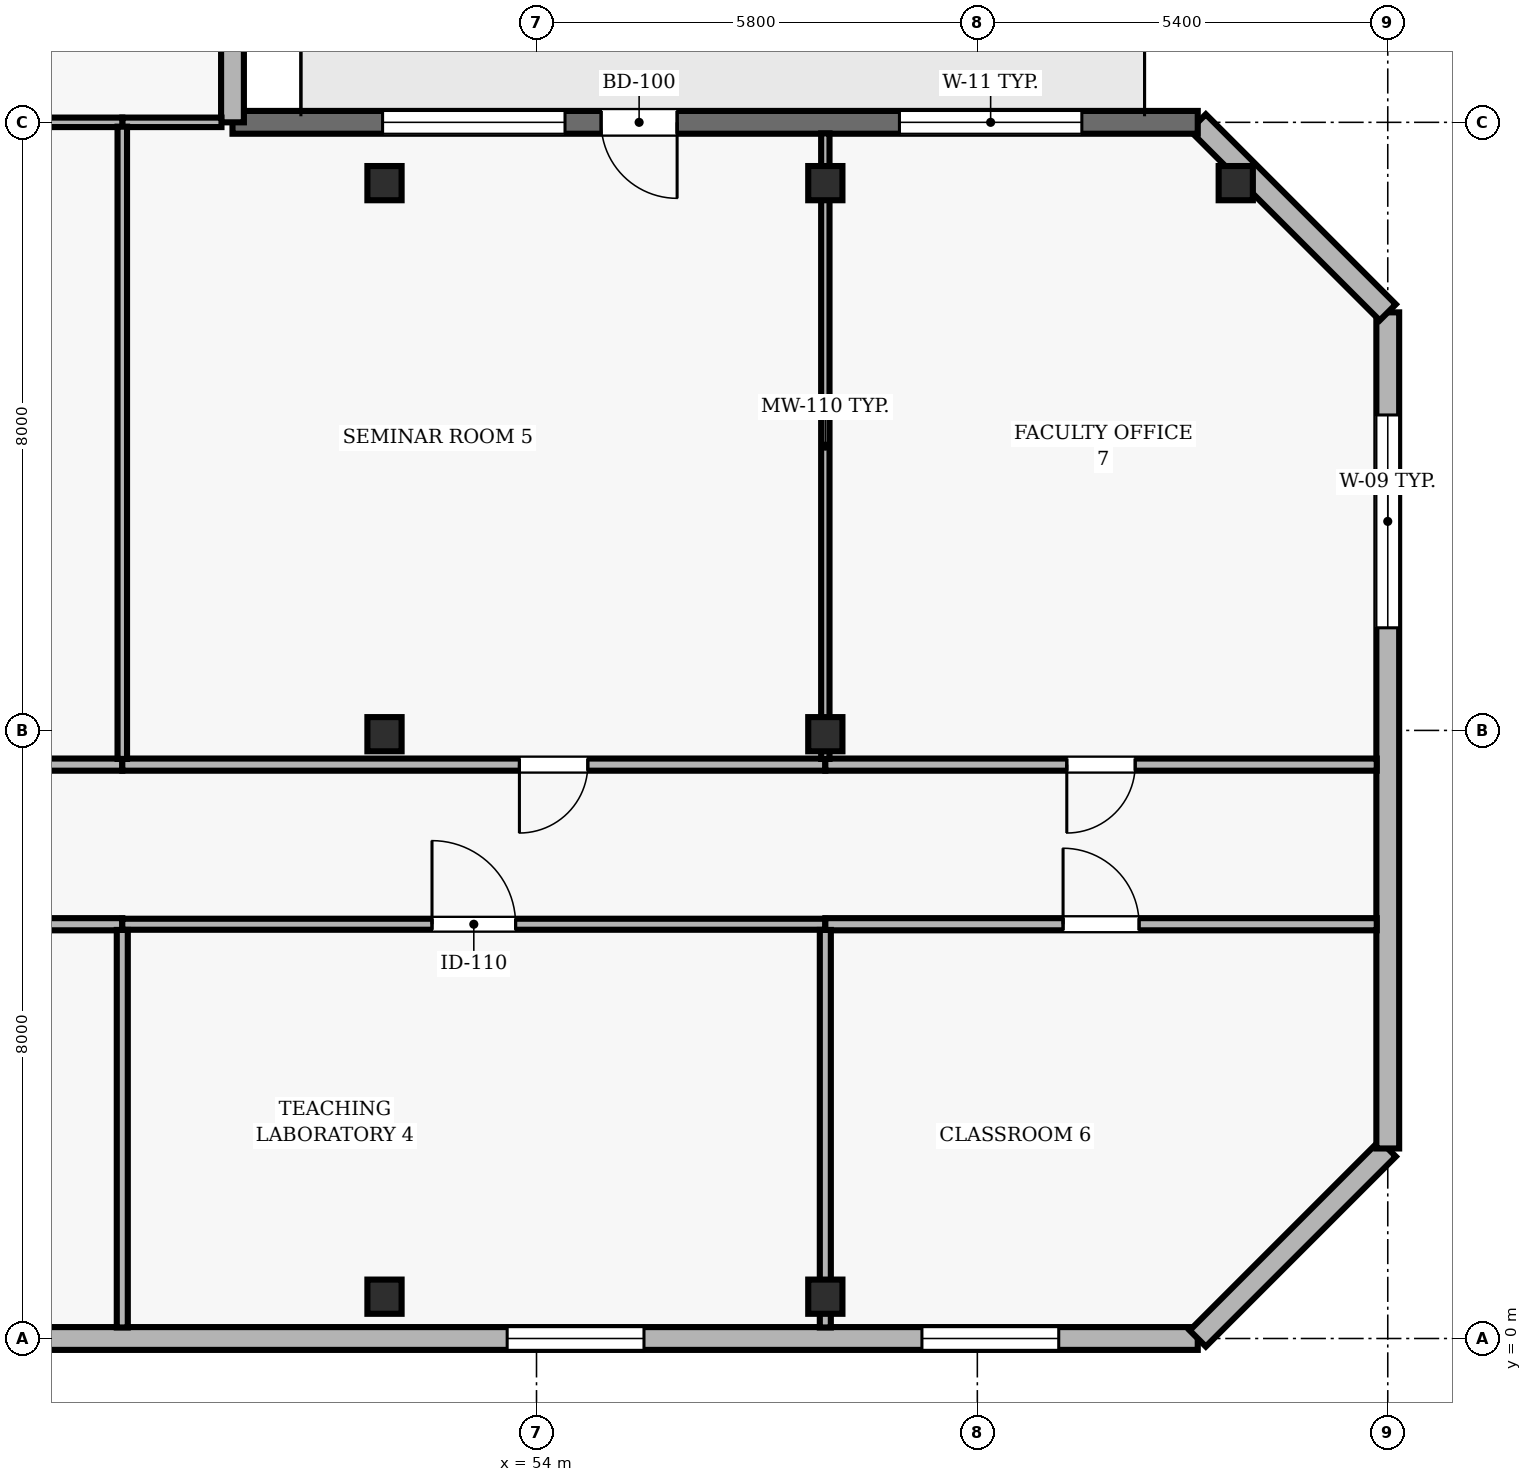
"""IFC4 building model, lengths in metres.
Left out: names, types, materials, properties, quantities, classifications, styles, units other than length and angle.
Written with IfcOpenShell. Run it as: python <this file> out.ifc"""

import sys

from ifc_helpers import new_model, si_unit, direction, frame, frame_2d, origin, origin_2d, place, context, subcontext, project, spatial, rectangle, hollow_rectangle, extrude, element, fill, save


model = new_model("IFC4")
c1 = context("Model", 3, precision=1e-05, world=origin(), true_north=direction((0.0, 1.0)))
c2 = subcontext(c1, "Body", "Model", "MODEL_VIEW")
j1 = project(units=[si_unit("LENGTHUNIT", "METRE"), si_unit("PLANEANGLEUNIT", "RADIAN")], contexts=[c1])
p1 = place(None, origin())
s1 = spatial("IfcSite", under=j1, at=p1, CompositionType="ELEMENT")
p2 = place(p1, origin())
s2 = spatial("IfcBuilding", under=s1, at=p2, CompositionType="ELEMENT")
p3 = place(p2, frame((0.0, 0.0, 175.8)))
s3 = spatial("IfcBuildingStorey", under=s2, at=p3, CompositionType="ELEMENT", Elevation=175.8)
for number, where, z_axis, x_axis in (
    (1, (52.0, 0.55, 0.0), (0.0, 0.0, 1.0), (1.0, 0.0, 0.0)),
    (2, (52.0, 7.95, 0.0), (0.0, 0.0, 1.0), (1.0, 0.0, 0.0)),
    (3, (52.0, 15.2, 0.0), (0.0, 0.0, 1.0), (1.0, 0.0, 0.0)),
    (4, (57.8, 0.55, 0.0), (0.0, 0.0, 1.0), (1.0, 0.0, 0.0)),
    (5, (57.8, 7.95, 0.0), (0.0, 0.0, 1.0), (1.0, 0.0, 0.0)),
    (6, (57.8, 15.2, 0.0), (0.0, 0.0, 1.0), (1.0, 0.0, 0.0)),
    (7, (63.2, 15.2, 0.0), (0.0, 0.0, 1.0), (1.0, 0.0, 0.0)),
):
    element("IfcColumn", number, at=place(p3, frame(where, z_axis=z_axis, x_axis=x_axis)), inside=s3, PredefinedType="COLUMN", context=c2, shape_type="SweptSolid", body=[
        extrude(hollow_rectangle(XDim=0.45, YDim=0.45, WallThickness=0.02, at=origin_2d()), origin(), (0.0, 0.0, 1.0), 3.9),
    ])
p4 = place(p3, frame((24.5, 0.0, 0.0), z_axis=(0.0, 0.0, 1.0), x_axis=(1.0, 0.0, 0.0)))
e8 = element("IfcWall", 8, at=p4, inside=s3, PredefinedType="SOLIDWALL", context=c2, shape_type="SweptSolid", body=[
    extrude(rectangle(XDim=38.2, YDim=0.3, at=frame_2d((19.1, 0.0))), origin(), (0.0, 0.0, 1.0), 3.69),
])
p5 = place(p4, frame((1.829, 0.0, 0.9)))
e9 = element("IfcOpeningElement", 9, at=p5, cuts=e8, PredefinedType="OPENING", context=c2, shape_type="SweptSolid", body=[
    extrude(rectangle(XDim=1.8, YDim=1.8, at=frame_2d((0.9, 0.9))), frame((0.0, 0.16, 0.0), z_axis=(0.0, -1.0, 0.0), x_axis=(1.0, 0.0, 0.0)), (0.0, 0.0, 1.0), 0.32),
])
p6 = place(p4, frame((8.186, 0.0, 0.9)))
e10 = element("IfcOpeningElement", 10, at=p6, cuts=e8, PredefinedType="OPENING", context=c2, shape_type="SweptSolid", body=[
    extrude(rectangle(XDim=1.8, YDim=1.8, at=frame_2d((0.9, 0.9))), frame((0.0, 0.16, 0.0), z_axis=(0.0, -1.0, 0.0), x_axis=(1.0, 0.0, 0.0)), (0.0, 0.0, 1.0), 0.32),
])
p7 = place(p4, frame((18.2, 0.0, 0.9)))
e11 = element("IfcOpeningElement", 11, at=p7, cuts=e8, PredefinedType="OPENING", context=c2, shape_type="SweptSolid", body=[
    extrude(rectangle(XDim=1.8, YDim=1.8, at=frame_2d((0.9, 0.9))), frame((0.0, 0.16, 0.0), z_axis=(0.0, -1.0, 0.0), x_axis=(1.0, 0.0, 0.0)), (0.0, 0.0, 1.0), 0.32),
])
p8 = place(p4, frame((29.114, 0.0, 0.9)))
e12 = element("IfcOpeningElement", 12, at=p8, cuts=e8, PredefinedType="OPENING", context=c2, shape_type="SweptSolid", body=[
    extrude(rectangle(XDim=1.8, YDim=1.8, at=frame_2d((0.9, 0.9))), frame((0.0, 0.16, 0.0), z_axis=(0.0, -1.0, 0.0), x_axis=(1.0, 0.0, 0.0)), (0.0, 0.0, 1.0), 0.32),
])
p9 = place(p4, frame((34.571, 0.0, 0.9)))
e13 = element("IfcOpeningElement", 13, at=p9, cuts=e8, PredefinedType="OPENING", context=c2, shape_type="SweptSolid", body=[
    extrude(rectangle(XDim=1.8, YDim=1.8, at=frame_2d((0.9, 0.9))), frame((0.0, 0.16, 0.0), z_axis=(0.0, -1.0, 0.0), x_axis=(1.0, 0.0, 0.0)), (0.0, 0.0, 1.0), 0.32),
])
p10 = place(p3, frame((62.7, 0.0, 0.0), z_axis=(0.0, 0.0, 1.0), x_axis=(0.707106781187, 0.707106781187, 0.0)))
e14 = element("IfcWall", 14, at=p10, inside=s3, PredefinedType="SOLIDWALL", context=c2, shape_type="SweptSolid", body=[
    extrude(rectangle(XDim=3.536, YDim=0.3, at=frame_2d((1.768, 0.0))), origin(), (0.0, 0.0, 1.0), 3.69),
])
p11 = place(p3, frame((65.2, 2.5, 0.0), z_axis=(0.0, 0.0, 1.0), x_axis=(0.0, 1.0, 0.0)))
e15 = element("IfcWall", 15, at=p11, inside=s3, PredefinedType="SOLIDWALL", context=c2, shape_type="SweptSolid", body=[
    extrude(rectangle(XDim=11.0, YDim=0.3, at=frame_2d((5.5, 0.0))), origin(), (0.0, 0.0, 1.0), 3.69),
])
p12 = place(p11, frame((6.85, 0.0, 0.9)))
e16 = element("IfcOpeningElement", 16, at=p12, cuts=e15, PredefinedType="OPENING", context=c2, shape_type="SweptSolid", body=[
    extrude(rectangle(XDim=2.8, YDim=1.8, at=frame_2d((1.4, 0.9))), frame((0.0, 0.16, 0.0), z_axis=(0.0, -1.0, 0.0), x_axis=(1.0, 0.0, 0.0)), (0.0, 0.0, 1.0), 0.32),
])
p13 = place(p3, frame((65.2, 13.5, 0.0), z_axis=(0.0, 0.0, 1.0), x_axis=(-0.707106781187, 0.707106781187, 0.0)))
e17 = element("IfcWall", 17, at=p13, inside=s3, PredefinedType="SOLIDWALL", context=c2, shape_type="SweptSolid", body=[
    extrude(rectangle(XDim=3.536, YDim=0.3, at=frame_2d((1.768, 0.0))), origin(), (0.0, 0.0, 1.0), 3.69),
])
p14 = place(p3, frame((62.7, 16.0, 0.0), z_axis=(0.0, 0.0, 1.0), x_axis=(-1.0, 0.0, 0.0)))
e18 = element("IfcWall", 18, at=p14, inside=s3, PredefinedType="SOLIDWALL", context=c2, shape_type="SweptSolid", body=[
    extrude(rectangle(XDim=12.7, YDim=0.3, at=frame_2d((6.35, 0.0))), origin(), (0.0, 0.0, 1.0), 3.69),
])
p15 = place(p14, frame((6.85, 0.0, 0.0)))
e19 = element("IfcOpeningElement", 19, at=p15, cuts=e18, PredefinedType="OPENING", context=c2, shape_type="SweptSolid", body=[
    extrude(rectangle(XDim=1.0, YDim=2.2, at=frame_2d((0.5, 1.1))), frame((0.0, 0.16, 0.0), z_axis=(0.0, -1.0, 0.0), x_axis=(1.0, 0.0, 0.0)), (0.0, 0.0, 1.0), 0.32),
])
p16 = place(p14, frame((1.525, 0.0, 0.9)))
e20 = element("IfcOpeningElement", 20, at=p16, cuts=e18, PredefinedType="OPENING", context=c2, shape_type="SweptSolid", body=[
    extrude(rectangle(XDim=2.4, YDim=2.2, at=frame_2d((1.2, 1.1))), frame((0.0, 0.16, 0.0), z_axis=(0.0, -1.0, 0.0), x_axis=(1.0, 0.0, 0.0)), (0.0, 0.0, 1.0), 0.32),
])
p17 = place(p14, frame((8.325, 0.0, 0.9)))
e21 = element("IfcOpeningElement", 21, at=p17, cuts=e18, PredefinedType="OPENING", context=c2, shape_type="SweptSolid", body=[
    extrude(rectangle(XDim=2.4, YDim=2.2, at=frame_2d((1.2, 1.1))), frame((0.0, 0.16, 0.0), z_axis=(0.0, -1.0, 0.0), x_axis=(1.0, 0.0, 0.0)), (0.0, 0.0, 1.0), 0.32),
])
p18 = place(p3, frame((50.0, 16.0, 0.0), z_axis=(0.0, 0.0, 1.0), x_axis=(0.0, 1.0, 0.0)))
e22 = element("IfcWall", 22, at=p18, inside=s3, PredefinedType="SOLIDWALL", context=c2, shape_type="SweptSolid", body=[
    extrude(rectangle(XDim=7.44, YDim=0.3, at=frame_2d((3.72, 0.0))), origin(), (0.0, 0.0, 1.0), 3.69),
])
p19 = place(p18, frame((2.22, 0.0, 0.9)))
e23 = element("IfcOpeningElement", 23, at=p19, cuts=e22, PredefinedType="OPENING", context=c2, shape_type="SweptSolid", body=[
    extrude(rectangle(XDim=3.0, YDim=2.2, at=frame_2d((1.5, 1.1))), frame((0.0, 0.16, 0.0), z_axis=(0.0, -1.0, 0.0), x_axis=(1.0, 0.0, 0.0)), (0.0, 0.0, 1.0), 0.32),
])
p20 = place(p3, frame((40.35, 5.45, 0.0), z_axis=(0.0, 0.0, 1.0), x_axis=(1.0, 0.0, 0.0)))
e24 = element("IfcWall", 24, at=p20, inside=s3, PredefinedType="PARTITIONING", context=c2, shape_type="SweptSolid", body=[
    extrude(rectangle(XDim=8.2, YDim=0.16, at=frame_2d((4.1, 0.0))), origin(), (0.0, 0.0, 1.0), 3.343),
])
p21 = place(p20, frame((3.65, 0.0, 0.0)))
e25 = element("IfcOpeningElement", 25, at=p21, cuts=e24, PredefinedType="OPENING", context=c2, shape_type="SweptSolid", body=[
    extrude(rectangle(XDim=0.9, YDim=2.1, at=frame_2d((0.45, 1.05))), frame((0.0, 0.09, 0.0), z_axis=(0.0, -1.0, 0.0), x_axis=(1.0, 0.0, 0.0)), (0.0, 0.0, 1.0), 0.18),
])
p22 = place(p3, frame((48.55, 5.45, 0.0), z_axis=(0.0, 0.0, 1.0), x_axis=(1.0, 0.0, 0.0)))
e26 = element("IfcWall", 26, at=p22, inside=s3, PredefinedType="PARTITIONING", context=c2, shape_type="SweptSolid", body=[
    extrude(rectangle(XDim=9.25, YDim=0.145, at=frame_2d((4.625, 0.0))), origin(), (0.0, 0.0, 1.0), 3.343),
])
p23 = place(p22, frame((4.075, 0.0, 0.0)))
e27 = element("IfcOpeningElement", 27, at=p23, cuts=e26, PredefinedType="OPENING", context=c2, shape_type="SweptSolid", body=[
    extrude(rectangle(XDim=1.1, YDim=2.15, at=frame_2d((0.55, 1.075))), frame((0.0, 0.083, 0.0), z_axis=(0.0, -1.0, 0.0), x_axis=(1.0, 0.0, 0.0)), (0.0, 0.0, 1.0), 0.165),
])
p24 = place(p3, frame((48.55, 7.55, 0.0), z_axis=(0.0, 0.0, 1.0), x_axis=(-1.0, 0.0, 0.0)))
e28 = element("IfcWall", 28, at=p24, inside=s3, PredefinedType="PARTITIONING", context=c2, shape_type="SweptSolid", body=[
    extrude(rectangle(XDim=8.2, YDim=0.16, at=frame_2d((4.1, 0.0))), origin(), (0.0, 0.0, 1.0), 3.139),
])
p25 = place(p3, frame((48.55, 16.0, 0.0), z_axis=(0.0, 0.0, 1.0), x_axis=(1.0, 0.0, 0.0)))
e29 = element("IfcWall", 29, at=p25, inside=s3, PredefinedType="PARTITIONING", context=c2, shape_type="SweptSolid", body=[
    extrude(rectangle(XDim=1.305, YDim=0.125, at=frame_2d((0.652, 0.0))), origin(), (0.0, 0.0, 1.0), 3.69),
])
p26 = place(p3, frame((48.55, 16.0, 0.0), z_axis=(0.0, 0.0, 1.0), x_axis=(-1.0, 0.0, 0.0)))
e30 = element("IfcWall", 30, at=p26, inside=s3, PredefinedType="PARTITIONING", context=c2, shape_type="SweptSolid", body=[
    extrude(rectangle(XDim=8.2, YDim=0.125, at=frame_2d((4.1, 0.0))), origin(), (0.0, 0.0, 1.0), 3.69),
])
p27 = place(p3, frame((57.8, 5.45, 0.0), z_axis=(0.0, 0.0, 1.0), x_axis=(1.0, 0.0, 0.0)))
e31 = element("IfcWall", 31, at=p27, inside=s3, PredefinedType="PARTITIONING", context=c2, shape_type="SweptSolid", body=[
    extrude(rectangle(XDim=7.255, YDim=0.16, at=frame_2d((3.627, 0.0))), origin(), (0.0, 0.0, 1.0), 3.69),
])
p28 = place(p27, frame((3.128, 0.0, 0.0)))
e32 = element("IfcOpeningElement", 32, at=p28, cuts=e31, PredefinedType="OPENING", context=c2, shape_type="SweptSolid", body=[
    extrude(rectangle(XDim=1.0, YDim=2.1, at=frame_2d((0.5, 1.05))), frame((0.0, 0.09, 0.0), z_axis=(0.0, -1.0, 0.0), x_axis=(1.0, 0.0, 0.0)), (0.0, 0.0, 1.0), 0.18),
])
p29 = place(p3, frame((57.8, 7.55, 0.0), z_axis=(0.0, 0.0, 1.0), x_axis=(-1.0, 0.0, 0.0)))
e33 = element("IfcWall", 33, at=p29, inside=s3, PredefinedType="PARTITIONING", context=c2, shape_type="SweptSolid", body=[
    extrude(rectangle(XDim=9.25, YDim=0.16, at=frame_2d((4.625, 0.0))), origin(), (0.0, 0.0, 1.0), 3.139),
])
p30 = place(p29, frame((3.125, 0.0, 0.0)))
e34 = element("IfcOpeningElement", 34, at=p30, cuts=e33, PredefinedType="OPENING", context=c2, shape_type="SweptSolid", body=[
    extrude(rectangle(XDim=0.9, YDim=2.1, at=frame_2d((0.45, 1.05))), frame((0.0, 0.09, 0.0), z_axis=(0.0, -1.0, 0.0), x_axis=(1.0, 0.0, 0.0)), (0.0, 0.0, 1.0), 0.18),
])
p31 = place(p3, frame((65.055, 7.55, 0.0), z_axis=(0.0, 0.0, 1.0), x_axis=(-1.0, 0.0, 0.0)))
e35 = element("IfcWall", 35, at=p31, inside=s3, PredefinedType="PARTITIONING", context=c2, shape_type="SweptSolid", body=[
    extrude(rectangle(XDim=7.255, YDim=0.16, at=frame_2d((3.627, 0.0))), origin(), (0.0, 0.0, 1.0), 3.69),
])
p32 = place(p31, frame((3.178, 0.0, 0.0)))
e36 = element("IfcOpeningElement", 36, at=p32, cuts=e35, PredefinedType="OPENING", context=c2, shape_type="SweptSolid", body=[
    extrude(rectangle(XDim=0.9, YDim=2.1, at=frame_2d((0.45, 1.05))), frame((0.0, 0.09, 0.0), z_axis=(0.0, -1.0, 0.0), x_axis=(1.0, 0.0, 0.0)), (0.0, 0.0, 1.0), 0.18),
])
p33 = place(p3, frame((48.55, 0.145, 0.0), z_axis=(0.0, 0.0, 1.0), x_axis=(0.0, 1.0, 0.0)))
e37 = element("IfcWall", 37, at=p33, inside=s3, PredefinedType="PARTITIONING", context=c2, shape_type="SweptSolid", body=[
    extrude(rectangle(XDim=5.23, YDim=0.145, at=frame_2d((2.615, 0.0))), origin(), (0.0, 0.0, 1.0), 3.69),
])
p34 = place(p3, frame((48.55, 7.625, 0.0), z_axis=(0.0, 0.0, 1.0), x_axis=(0.0, 1.0, 0.0)))
e38 = element("IfcWall", 38, at=p34, inside=s3, PredefinedType="PARTITIONING", context=c2, shape_type="SweptSolid", body=[
    extrude(rectangle(XDim=8.318, YDim=0.125, at=frame_2d((4.159, 0.0))), origin(), (0.0, 0.0, 1.0), 3.69),
])
p35 = place(p3, frame((57.8, 0.145, 0.0), z_axis=(0.0, 0.0, 1.0), x_axis=(0.0, 1.0, 0.0)))
e39 = element("IfcWall", 39, at=p35, inside=s3, PredefinedType="PARTITIONING", context=c2, shape_type="SweptSolid", body=[
    extrude(rectangle(XDim=5.23, YDim=0.145, at=frame_2d((2.615, 0.0))), origin(), (0.0, 0.0, 1.0), 3.139),
])
p36 = place(p3, frame((57.8, 7.625, 0.0), z_axis=(0.0, 0.0, 1.0), x_axis=(0.0, 1.0, 0.0)))
e40 = element("IfcWall", 40, at=p36, inside=s3, PredefinedType="MOVABLE", context=c2, shape_type="SweptSolid", body=[
    extrude(rectangle(XDim=8.23, YDim=0.11, at=frame_2d((4.115, 0.0))), origin(), (0.0, 0.0, 1.0), 3.139),
])
p37 = place(p8, origin())
e41 = element("IfcWindow", 41, at=p37, inside=s3, PartitioningType="SINGLE_PANEL", PredefinedType="WINDOW", context=c2, shape_type="SweptSolid", body=[
    extrude(rectangle(XDim=1.8, YDim=1.8, at=frame_2d((0.9, 0.9))), frame((0.0, 0.03, 0.0), z_axis=(0.0, -1.0, 0.0), x_axis=(1.0, 0.0, 0.0)), (0.0, 0.0, 1.0), 0.06),
])
fill(e12, e41)
p38 = place(p9, origin())
e42 = element("IfcWindow", 42, at=p38, inside=s3, PartitioningType="SINGLE_PANEL", PredefinedType="WINDOW", context=c2, shape_type="SweptSolid", body=[
    extrude(rectangle(XDim=1.8, YDim=1.8, at=frame_2d((0.9, 0.9))), frame((0.0, 0.03, 0.0), z_axis=(0.0, -1.0, 0.0), x_axis=(1.0, 0.0, 0.0)), (0.0, 0.0, 1.0), 0.06),
])
fill(e13, e42)
p39 = place(p12, origin())
e43 = element("IfcWindow", 43, at=p39, inside=s3, PartitioningType="SINGLE_PANEL", PredefinedType="WINDOW", context=c2, shape_type="SweptSolid", body=[
    extrude(rectangle(XDim=2.8, YDim=1.8, at=frame_2d((1.4, 0.9))), frame((0.0, 0.03, 0.0), z_axis=(0.0, -1.0, 0.0), x_axis=(1.0, 0.0, 0.0)), (0.0, 0.0, 1.0), 0.06),
])
fill(e16, e43)
p40 = place(p15, origin())
e44 = element("IfcDoor", 44, at=p40, inside=s3, OperationType="SINGLE_SWING_LEFT", PredefinedType="DOOR", context=c2, shape_type="SweptSolid", body=[
    extrude(rectangle(XDim=1.0, YDim=2.2, at=frame_2d((0.5, 1.1))), frame((0.0, 0.025, 0.0), z_axis=(0.0, -1.0, 0.0), x_axis=(1.0, 0.0, 0.0)), (0.0, 0.0, 1.0), 0.05),
])
fill(e19, e44)
p41 = place(p16, origin())
e45 = element("IfcWindow", 45, at=p41, inside=s3, PartitioningType="SINGLE_PANEL", PredefinedType="WINDOW", context=c2, shape_type="SweptSolid", body=[
    extrude(rectangle(XDim=2.4, YDim=2.2, at=frame_2d((1.2, 1.1))), frame((0.0, 0.03, 0.0), z_axis=(0.0, -1.0, 0.0), x_axis=(1.0, 0.0, 0.0)), (0.0, 0.0, 1.0), 0.06),
])
fill(e20, e45)
p42 = place(p17, origin())
e46 = element("IfcWindow", 46, at=p42, inside=s3, PartitioningType="SINGLE_PANEL", PredefinedType="WINDOW", context=c2, shape_type="SweptSolid", body=[
    extrude(rectangle(XDim=2.4, YDim=2.2, at=frame_2d((1.2, 1.1))), frame((0.0, 0.03, 0.0), z_axis=(0.0, -1.0, 0.0), x_axis=(1.0, 0.0, 0.0)), (0.0, 0.0, 1.0), 0.06),
])
fill(e21, e46)
p43 = place(p23, origin())
e47 = element("IfcDoor", 47, at=p43, inside=s3, OperationType="SINGLE_SWING_LEFT", PredefinedType="DOOR", context=c2, shape_type="SweptSolid", body=[
    extrude(rectangle(XDim=1.1, YDim=2.15, at=frame_2d((0.55, 1.075))), frame((0.0, 0.025, 0.0), z_axis=(0.0, -1.0, 0.0), x_axis=(1.0, 0.0, 0.0)), (0.0, 0.0, 1.0), 0.05),
])
fill(e27, e47)
p44 = place(p30, origin())
e48 = element("IfcDoor", 48, at=p44, inside=s3, OperationType="SINGLE_SWING_RIGHT", PredefinedType="DOOR", context=c2, shape_type="SweptSolid", body=[
    extrude(rectangle(XDim=0.9, YDim=2.1, at=frame_2d((0.45, 1.05))), frame((0.0, 0.025, 0.0), z_axis=(0.0, -1.0, 0.0), x_axis=(1.0, 0.0, 0.0)), (0.0, 0.0, 1.0), 0.05),
])
fill(e34, e48)
p45 = place(p28, origin())
e49 = element("IfcDoor", 49, at=p45, inside=s3, OperationType="SINGLE_SWING_LEFT", PredefinedType="DOOR", context=c2, shape_type="SweptSolid", body=[
    extrude(rectangle(XDim=1.0, YDim=2.1, at=frame_2d((0.5, 1.05))), frame((0.0, 0.025, 0.0), z_axis=(0.0, -1.0, 0.0), x_axis=(1.0, 0.0, 0.0)), (0.0, 0.0, 1.0), 0.05),
])
fill(e32, e49)
p46 = place(p32, origin())
e50 = element("IfcDoor", 50, at=p46, inside=s3, OperationType="SINGLE_SWING_RIGHT", PredefinedType="DOOR", context=c2, shape_type="SweptSolid", body=[
    extrude(rectangle(XDim=0.9, YDim=2.1, at=frame_2d((0.45, 1.05))), frame((0.0, 0.025, 0.0), z_axis=(0.0, -1.0, 0.0), x_axis=(1.0, 0.0, 0.0)), (0.0, 0.0, 1.0), 0.05),
])
fill(e36, e50)
save(model, sys.argv[1])
